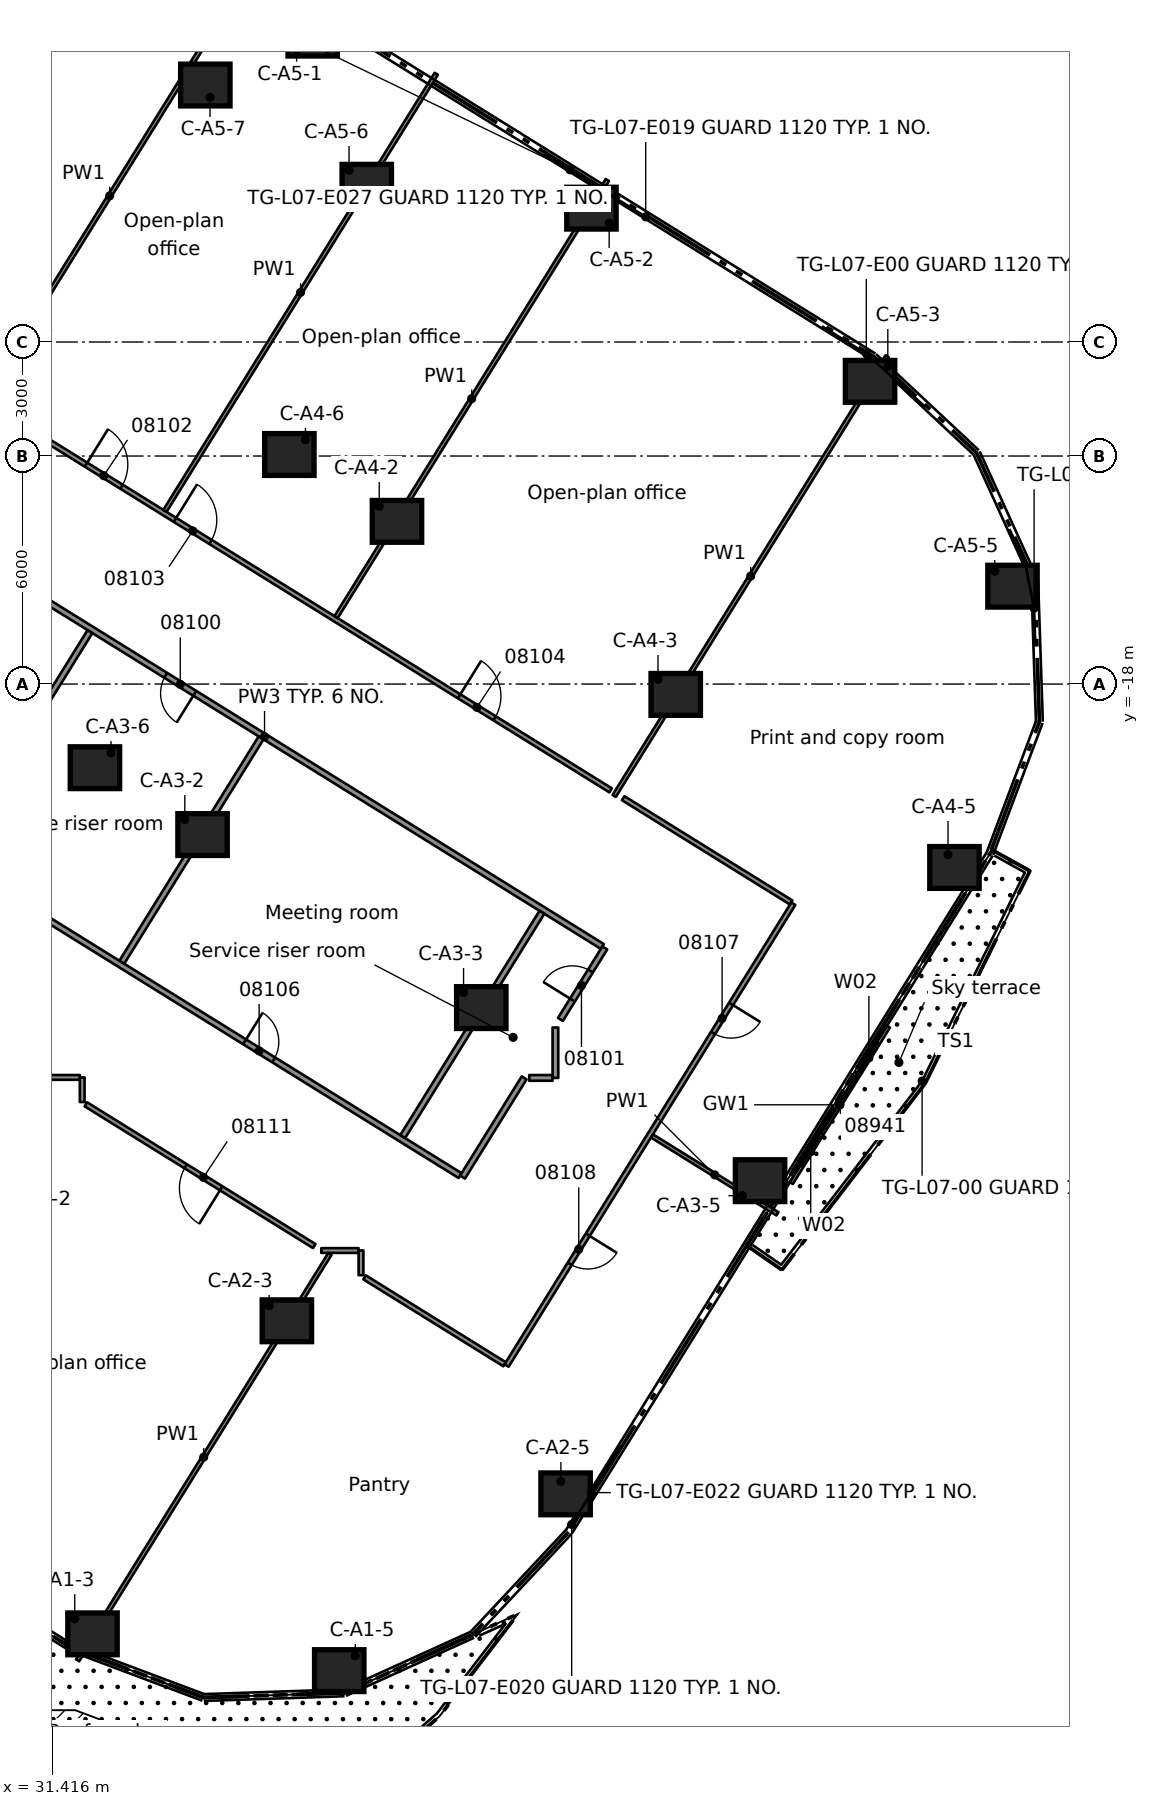
"""IFC4 building model, lengths in metres.
Left out: names, types, materials, properties, quantities, classifications, styles, units other than length and angle.
Written with IfcOpenShell. Run it as: python <this file> out.ifc"""

import sys

from ifc_helpers import new_model, si_unit, direction, frame, frame_2d, origin, origin_2d, place, context, subcontext, project, spatial, rectangle, extrude, element, fill, save


model = new_model("IFC4")
c1 = context("Model", 3, precision=1e-05, world=origin(), true_north=direction((0.0, 1.0)))
c2 = subcontext(c1, "Body", "Model", "MODEL_VIEW")
j1 = project(units=[si_unit("LENGTHUNIT", "METRE"), si_unit("PLANEANGLEUNIT", "RADIAN")], contexts=[c1])
p1 = place(None, origin())
s1 = spatial("IfcSite", under=j1, at=p1, CompositionType="ELEMENT")
p2 = place(p1, origin())
s2 = spatial("IfcBuilding", under=s1, at=p2, CompositionType="ELEMENT")
p3 = place(p2, frame((0.0, 0.0, 37.3)))
s3 = spatial("IfcBuildingStorey", under=s2, at=p3, CompositionType="ELEMENT", Elevation=37.3)
for number, where, z_axis, x_axis in (
    (1, (32.475, -42.992, 0.0), (0.0, 0.0, 1.0), (1.0, 0.0, 0.0)),
    (2, (38.968, -43.959, 0.0), (0.0, 0.0, 1.0), (1.0, 0.0, 0.0)),
    (3, (37.59, -34.754, 0.0), (0.0, 0.0, 1.0), (1.0, 0.0, 0.0)),
    (4, (44.924, -39.308, 0.0), (0.0, 0.0, 1.0), (1.0, 0.0, 0.0)),
    (5, (35.371, -21.96, 0.0), (0.0, 0.0, 1.0), (1.0, 0.0, 0.0)),
    (6, (42.706, -26.513, 0.0), (0.0, 0.0, 1.0), (1.0, 0.0, 0.0)),
    (7, (50.041, -31.067, 0.0), (0.0, 0.0, 1.0), (1.0, 0.0, 0.0)),
    (8, (32.539, -20.201, 0.0), (0.0, 0.0, 1.0), (1.0, 0.0, 0.0)),
    (9, (40.487, -13.719, 0.0), (0.0, 0.0, 1.0), (1.0, 0.0, 0.0)),
    (10, (47.822, -18.272, 0.0), (0.0, 0.0, 1.0), (1.0, 0.0, 0.0)),
    (11, (55.157, -22.826, 0.0), (0.0, 0.0, 1.0), (1.0, 0.0, 0.0)),
    (12, (37.655, -11.96, 0.0), (0.0, 0.0, 1.0), (1.0, 0.0, 0.0)),
    (13, (38.269, -0.924, 0.0), (0.0, 0.0, 1.0), (1.0, 0.0, 0.0)),
    (14, (45.604, -5.478, 0.0), (0.0, 0.0, 1.0), (1.0, 0.0, 0.0)),
    (15, (52.936, -10.035, 0.0), (0.0, 0.0, 1.0), (1.0, 0.0, 0.0)),
    (16, (56.684, -15.425, 0.0), (0.0, 0.0, 1.0), (1.0, 0.0, 0.0)),
    (17, (39.692, -4.876, 0.0), (0.0, 0.0, 1.0), (1.0, 0.0, 0.0)),
    (18, (35.444, -2.238, 0.0), (0.0, 0.0, 1.0), (1.0, 0.0, 0.0)),
):
    element("IfcColumn", number, at=place(p3, frame(where, z_axis=z_axis, x_axis=x_axis)), inside=s3, PredefinedType="COLUMN", context=c2, shape_type="SweptSolid", body=[
        extrude(rectangle(XDim=1.3, YDim=1.1, at=origin_2d()), origin(), (0.0, 0.0, 1.0), 3.5),
    ])
p4 = place(p3, frame((53.417, -27.013, 0.0), z_axis=(0.0, 0.0, 1.0), x_axis=(-0.527459466272, -0.84958019718, 0.0)))
e19 = element("IfcWall", 19, at=p4, inside=s3, PredefinedType="STANDARD", context=c2, shape_type="SweptSolid", body=[
    extrude(rectangle(XDim=4.844, YDim=0.1, at=frame_2d((2.422, 0.0))), origin(), (0.0, 0.0, 1.0), 3.08),
])
p5 = place(p4, frame((1.522, 0.0, 0.0)))
e20 = element("IfcOpeningElement", 20, at=p5, cuts=e19, PredefinedType="OPENING", context=c2, shape_type="SweptSolid", body=[
    extrude(rectangle(XDim=1.8, YDim=2.4, at=frame_2d((0.9, 1.2))), frame((0.0, 0.06, 0.0), z_axis=(0.0, -1.0, 0.0), x_axis=(1.0, 0.0, 0.0)), (0.0, 0.0, 1.0), 0.12),
])
p6 = place(p4, frame((0.522, 0.0, 0.0)))
e21 = element("IfcOpeningElement", 21, at=p6, cuts=e19, PredefinedType="OPENING", context=c2, shape_type="SweptSolid", body=[
    extrude(rectangle(XDim=0.9, YDim=2.4, at=frame_2d((0.45, 1.2))), frame((0.0, 0.06, 0.0), z_axis=(0.0, -1.0, 0.0), x_axis=(1.0, 0.0, 0.0)), (0.0, 0.0, 1.0), 0.12),
])
p7 = place(p4, frame((3.422, 0.0, 0.0)))
e22 = element("IfcOpeningElement", 22, at=p7, cuts=e19, PredefinedType="OPENING", context=c2, shape_type="SweptSolid", body=[
    extrude(rectangle(XDim=0.9, YDim=2.4, at=frame_2d((0.45, 1.2))), frame((0.0, 0.06, 0.0), z_axis=(0.0, -1.0, 0.0), x_axis=(1.0, 0.0, 0.0)), (0.0, 0.0, 1.0), 0.12),
])
p8 = place(p3, frame((38.31, -32.788, 0.0), z_axis=(0.0, 0.0, 1.0), x_axis=(-0.849663629849, 0.527325057352, 0.0)))
e23 = element("IfcWall", 23, at=p8, inside=s3, PredefinedType="PARTITIONING", context=c2, shape_type="SweptSolid", body=[
    extrude(rectangle(XDim=7.073, YDim=0.125, at=frame_2d((3.537, 0.0))), origin(), (0.0, 0.0, 1.0), 3.06),
])
p9 = place(p8, frame((2.881, 0.0, 0.0)))
e24 = element("IfcOpeningElement", 24, at=p9, cuts=e23, PredefinedType="OPENING", context=c2, shape_type="SweptSolid", body=[
    extrude(rectangle(XDim=1.1, YDim=2.1, at=frame_2d((0.55, 1.05))), frame((0.0, 0.073, 0.0), z_axis=(0.0, -1.0, 0.0), x_axis=(1.0, 0.0, 0.0)), (0.0, 0.0, 1.0), 0.145),
])
p10 = place(p3, frame((39.635, -33.612, 0.0), z_axis=(0.0, 0.0, 1.0), x_axis=(0.849721068894, -0.527232496226, 0.0)))
e25 = element("IfcWall", 25, at=p10, inside=s3, PredefinedType="PARTITIONING", context=c2, shape_type="SweptSolid", body=[
    extrude(rectangle(XDim=4.336, YDim=0.125, at=frame_2d((2.168, 0.0))), origin(), (0.0, 0.0, 1.0), 3.06),
])
p11 = place(p3, frame((29.735, -23.228, 0.0), z_axis=(0.0, 0.0, 1.0), x_axis=(0.849593173651, -0.527438564466, 0.0)))
e26 = element("IfcWall", 26, at=p11, inside=s3, PredefinedType="PARTITIONING", context=c2, shape_type="SweptSolid", body=[
    extrude(rectangle(XDim=14.61, YDim=0.15, at=frame_2d((7.305, 0.0))), origin(), (0.0, 0.0, 1.0), 3.06),
])
p12 = place(p11, frame((7.936, 0.0, 0.0)))
e27 = element("IfcOpeningElement", 27, at=p12, cuts=e26, PredefinedType="OPENING", context=c2, shape_type="SweptSolid", body=[
    extrude(rectangle(XDim=0.9, YDim=2.1, at=frame_2d((0.45, 1.05))), frame((0.0, 0.085, 0.0), z_axis=(0.0, -1.0, 0.0), x_axis=(1.0, 0.0, 0.0)), (0.0, 0.0, 1.0), 0.17),
])
p13 = place(p3, frame((47.196, -29.89, 0.0), z_axis=(0.0, 0.0, 1.0), x_axis=(0.84964889907, -0.527348791891, 0.0)))
e28 = element("IfcWall", 28, at=p13, inside=s3, PredefinedType="PARTITIONING", context=c2, shape_type="SweptSolid", body=[
    extrude(rectangle(XDim=3.887, YDim=0.1, at=frame_2d((1.944, 0.0))), origin(), (0.0, 0.0, 1.0), 3.06),
])
p14 = place(p3, frame((45.891, -24.905, 0.0), z_axis=(0.0, 0.0, 1.0), x_axis=(-0.849504231943, 0.527581803999, 0.0)))
e29 = element("IfcWall", 29, at=p14, inside=s3, PredefinedType="PARTITIONING", context=c2, shape_type="SweptSolid", body=[
    extrude(rectangle(XDim=20.927, YDim=0.15, at=frame_2d((10.464, 0.0))), origin(), (0.0, 0.0, 1.0), 3.06),
])
p15 = place(p14, frame((12.625, 0.0, 0.0)))
e30 = element("IfcOpeningElement", 30, at=p15, cuts=e29, PredefinedType="OPENING", context=c2, shape_type="SweptSolid", body=[
    extrude(rectangle(XDim=0.9, YDim=2.1, at=frame_2d((0.45, 1.05))), frame((0.0, 0.085, 0.0), z_axis=(0.0, -1.0, 0.0), x_axis=(1.0, 0.0, 0.0)), (0.0, 0.0, 1.0), 0.17),
])
p16 = place(p14, frame((17.925, 0.0, 0.0)))
e31 = element("IfcOpeningElement", 31, at=p16, cuts=e29, PredefinedType="OPENING", context=c2, shape_type="SweptSolid", body=[
    extrude(rectangle(XDim=1.1, YDim=2.1, at=frame_2d((0.55, 1.05))), frame((0.0, 0.085, 0.0), z_axis=(0.0, -1.0, 0.0), x_axis=(1.0, 0.0, 0.0)), (0.0, 0.0, 1.0), 0.17),
])
p17 = place(p3, frame((31.21, -11.548, 0.0), z_axis=(0.0, 0.0, 1.0), x_axis=(0.849604026752, -0.527421081989, 0.0)))
e32 = element("IfcWall", 32, at=p17, inside=s3, PredefinedType="PARTITIONING", context=c2, shape_type="SweptSolid", body=[
    extrude(rectangle(XDim=17.536, YDim=0.125, at=frame_2d((8.768, 0.0))), origin(), (0.0, 0.0, 1.0), 3.06),
])
p18 = place(p17, frame((1.288, 0.0, 0.0)))
e33 = element("IfcOpeningElement", 33, at=p18, cuts=e32, PredefinedType="OPENING", context=c2, shape_type="SweptSolid", body=[
    extrude(rectangle(XDim=1.1, YDim=2.1, at=frame_2d((0.55, 1.05))), frame((0.0, 0.073, 0.0), z_axis=(0.0, -1.0, 0.0), x_axis=(1.0, 0.0, 0.0)), (0.0, 0.0, 1.0), 0.145),
])
p19 = place(p17, frame((4.043, 0.0, 0.0)))
e34 = element("IfcOpeningElement", 34, at=p19, cuts=e32, PredefinedType="OPENING", context=c2, shape_type="SweptSolid", body=[
    extrude(rectangle(XDim=1.1, YDim=2.1, at=frame_2d((0.55, 1.05))), frame((0.0, 0.073, 0.0), z_axis=(0.0, -1.0, 0.0), x_axis=(1.0, 0.0, 0.0)), (0.0, 0.0, 1.0), 0.145),
])
p20 = place(p17, frame((12.844, 0.0, 0.0)))
e35 = element("IfcOpeningElement", 35, at=p20, cuts=e32, PredefinedType="OPENING", context=c2, shape_type="SweptSolid", body=[
    extrude(rectangle(XDim=1.1, YDim=2.1, at=frame_2d((0.55, 1.05))), frame((0.0, 0.073, 0.0), z_axis=(0.0, -1.0, 0.0), x_axis=(1.0, 0.0, 0.0)), (0.0, 0.0, 1.0), 0.145),
])
p21 = place(p3, frame((46.439, -21.003, 0.0), z_axis=(0.0, 0.0, 1.0), x_axis=(0.849609726163, -0.527411900899, 0.0)))
e36 = element("IfcWall", 36, at=p21, inside=s3, PredefinedType="PARTITIONING", context=c2, shape_type="SweptSolid", body=[
    extrude(rectangle(XDim=5.205, YDim=0.125, at=frame_2d((2.603, 0.0))), origin(), (0.0, 0.0, 1.0), 3.06),
])
p22 = place(p3, frame((38.496, -32.905, 0.0), z_axis=(0.0, 0.0, 1.0), x_axis=(1.0, 0.0, 0.0)))
e37 = element("IfcWall", 37, at=p22, inside=s3, PredefinedType="PARTITIONING", context=c2, shape_type="SweptSolid", body=[
    extrude(rectangle(XDim=0.981, YDim=0.125, at=frame_2d((0.49, 0.0))), origin(), (0.0, 0.0, 1.0), 3.06),
])
p23 = place(p3, frame((43.968, -28.363, 0.0), z_axis=(0.0, 0.0, 1.0), x_axis=(1.0, 0.0, 0.0)))
e38 = element("IfcWall", 38, at=p23, inside=s3, PredefinedType="PARTITIONING", context=c2, shape_type="SweptSolid", body=[
    extrude(rectangle(XDim=0.613, YDim=0.15, at=frame_2d((0.307, 0.0))), origin(), (0.0, 0.0, 1.0), 3.06),
])
p24 = place(p3, frame((31.161, -28.35, 0.0), z_axis=(0.0, 0.0, 1.0), x_axis=(1.0, 0.0, 0.0)))
e39 = element("IfcWall", 39, at=p24, inside=s3, PredefinedType="PARTITIONING", context=c2, shape_type="SweptSolid", body=[
    extrude(rectangle(XDim=0.981, YDim=0.125, at=frame_2d((0.491, 0.0))), origin(), (0.0, 0.0, 1.0), 3.06),
])
p25 = place(p3, frame((50.916, -23.78, 0.0), z_axis=(0.0, 0.0, 1.0), x_axis=(-0.527464838764, -0.84957686166, 0.0)))
e40 = element("IfcWall", 40, at=p25, inside=s3, PredefinedType="PARTITIONING", context=c2, shape_type="SweptSolid", body=[
    extrude(rectangle(XDim=14.302, YDim=0.125, at=frame_2d((7.151, 0.0))), origin(), (0.0, 0.0, 1.0), 3.06),
])
p26 = place(p25, frame((3.103, 0.0, 0.0)))
e41 = element("IfcOpeningElement", 41, at=p26, cuts=e40, PredefinedType="OPENING", context=c2, shape_type="SweptSolid", body=[
    extrude(rectangle(XDim=0.9, YDim=2.1, at=frame_2d((0.45, 1.05))), frame((0.0, 0.073, 0.0), z_axis=(0.0, -1.0, 0.0), x_axis=(1.0, 0.0, 0.0)), (0.0, 0.0, 1.0), 0.145),
])
p27 = place(p25, frame((10.253, 0.0, 0.0)))
e42 = element("IfcOpeningElement", 42, at=p27, cuts=e40, PredefinedType="OPENING", context=c2, shape_type="SweptSolid", body=[
    extrude(rectangle(XDim=0.9, YDim=2.1, at=frame_2d((0.45, 1.05))), frame((0.0, 0.073, 0.0), z_axis=(0.0, -1.0, 0.0), x_axis=(1.0, 0.0, 0.0)), (0.0, 0.0, 1.0), 0.145),
])
p28 = place(p3, frame((42.212, -30.973, 0.0), z_axis=(0.0, 0.0, 1.0), x_axis=(0.527639763473, 0.849468233663, 0.0)))
e43 = element("IfcWall", 43, at=p28, inside=s3, PredefinedType="PARTITIONING", context=c2, shape_type="SweptSolid", body=[
    extrude(rectangle(XDim=3.072, YDim=0.15, at=frame_2d((1.536, 0.0))), origin(), (0.0, 0.0, 1.0), 3.06),
])
p29 = place(p3, frame((44.788, -26.825, 0.0), z_axis=(0.0, 0.0, 1.0), x_axis=(0.527094056537, 0.849806951938, 0.0)))
e44 = element("IfcWall", 44, at=p29, inside=s3, PredefinedType="PARTITIONING", context=c2, shape_type="SweptSolid", body=[
    extrude(rectangle(XDim=2.216, YDim=0.15, at=frame_2d((1.108, 0.0))), origin(), (0.0, 0.0, 1.0), 3.06),
])
p30 = place(p29, frame((0.6, 0.0, 0.0)))
e45 = element("IfcOpeningElement", 45, at=p30, cuts=e44, PredefinedType="OPENING", context=c2, shape_type="SweptSolid", body=[
    extrude(rectangle(XDim=0.9, YDim=2.1, at=frame_2d((0.45, 1.05))), frame((0.0, 0.085, 0.0), z_axis=(0.0, -1.0, 0.0), x_axis=(1.0, 0.0, 0.0)), (0.0, 0.0, 1.0), 0.17),
])
p31 = place(p3, frame((32.082, -43.688, 0.0), z_axis=(0.0, 0.0, 1.0), x_axis=(0.527487900205, 0.849562543394, 0.0)))
e46 = element("IfcWall", 46, at=p31, inside=s3, PredefinedType="PARTITIONING", context=c2, shape_type="SweptSolid", body=[
    extrude(rectangle(XDim=12.588, YDim=0.1, at=frame_2d((6.294, 0.0))), origin(), (0.0, 0.0, 1.0), 3.06),
])
p32 = place(p3, frame((40.638, -29.907, 0.0), z_axis=(0.0, 0.0, 1.0), x_axis=(0.527371608889, 0.849634736895, 0.0)))
e47 = element("IfcWall", 47, at=p32, inside=s3, PredefinedType="PARTITIONING", context=c2, shape_type="SweptSolid", body=[
    extrude(rectangle(XDim=6.948, YDim=0.15, at=frame_2d((3.474, 0.0))), origin(), (0.0, 0.0, 1.0), 3.06),
])
p33 = place(p3, frame((46.203, -20.944, 0.0), z_axis=(0.0, 0.0, 1.0), x_axis=(0.527452109832, 0.849584764361, 0.0)))
e48 = element("IfcWall", 48, at=p33, inside=s3, PredefinedType="PARTITIONING", context=c2, shape_type="SweptSolid", body=[
    extrude(rectangle(XDim=13.618, YDim=0.1, at=frame_2d((6.809, 0.0))), origin(), (0.0, 0.0, 1.0), 3.06),
])
p34 = place(p3, frame((33.247, -25.319, 0.0), z_axis=(0.0, 0.0, 1.0), x_axis=(0.527346241806, 0.849650481818, 0.0)))
e49 = element("IfcWall", 49, at=p34, inside=s3, PredefinedType="PARTITIONING", context=c2, shape_type="SweptSolid", body=[
    extrude(rectangle(XDim=6.948, YDim=0.15, at=frame_2d((3.474, 0.0))), origin(), (0.0, 0.0, 1.0), 3.06),
])
p35 = place(p3, frame((38.884, -16.239, 0.0), z_axis=(0.0, 0.0, 1.0), x_axis=(0.527383064754, 0.849627626087, 0.0)))
e50 = element("IfcWall", 50, at=p35, inside=s3, PredefinedType="PARTITIONING", context=c2, shape_type="SweptSolid", body=[
    extrude(rectangle(XDim=13.536, YDim=0.1, at=frame_2d((6.768, 0.0))), origin(), (0.0, 0.0, 1.0), 3.06),
])
p36 = place(p3, frame((28.46, -22.98, 0.0), z_axis=(0.0, 0.0, 1.0), x_axis=(0.527410761015, 0.849610433767, 0.0)))
e51 = element("IfcWall", 51, at=p36, inside=s3, PredefinedType="PARTITIONING", context=c2, shape_type="SweptSolid", body=[
    extrude(rectangle(XDim=7.486, YDim=0.15, at=frame_2d((3.743, 0.0))), origin(), (0.0, 0.0, 1.0), 3.06),
])
p37 = place(p3, frame((34.381, -13.443, 0.0), z_axis=(0.0, 0.0, 1.0), x_axis=(0.527467467503, 0.849575229586, 0.0)))
e52 = element("IfcWall", 52, at=p37, inside=s3, PredefinedType="PARTITIONING", context=c2, shape_type="SweptSolid", body=[
    extrude(rectangle(XDim=13.536, YDim=0.1, at=frame_2d((6.768, 0.0))), origin(), (0.0, 0.0, 1.0), 3.06),
])
p38 = place(p3, frame((29.098, -11.322, 0.0), z_axis=(0.0, 0.0, 1.0), x_axis=(0.527451584377, 0.849585090582, 0.0)))
e53 = element("IfcWall", 53, at=p38, inside=s3, PredefinedType="PARTITIONING", context=c2, shape_type="SweptSolid", body=[
    extrude(rectangle(XDim=14.521, YDim=0.1, at=frame_2d((7.26, 0.0))), origin(), (0.0, 0.0, 1.0), 3.06),
])
p39 = place(p3, frame((44.656, -28.363, 0.0), z_axis=(0.0, 0.0, 1.0), x_axis=(0.0, 1.0, 0.0)))
e54 = element("IfcWall", 54, at=p39, inside=s3, PredefinedType="PARTITIONING", context=c2, shape_type="SweptSolid", body=[
    extrude(rectangle(XDim=1.326, YDim=0.15, at=frame_2d((0.663, 0.0))), origin(), (0.0, 0.0, 1.0), 3.06),
])
for number, where, z_axis, x_axis in (
    (55, (39.54, -33.553, 0.0), (0.0, 0.0, 1.0), (0.0, 1.0, 0.0)),
    (56, (32.204, -28.998, 0.0), (0.0, 0.0, 1.0), (0.0, 1.0, 0.0)),
):
    element("IfcWall", number, at=place(p3, frame(where, z_axis=z_axis, x_axis=x_axis)), inside=s3, PredefinedType="PARTITIONING", context=c2, shape_type="SweptSolid", body=[
        extrude(rectangle(XDim=0.648, YDim=0.125, at=frame_2d((0.324, 0.0))), origin(), (0.0, 0.0, 1.0), 3.06),
    ])
p40 = place(p5, origin())
e57 = element("IfcDoor", 57, at=p40, inside=s3, OperationType="DOUBLE_DOOR_SLIDING", PredefinedType="DOOR", context=c2, shape_type="SweptSolid", body=[
    extrude(rectangle(XDim=1.8, YDim=2.4, at=frame_2d((0.9, 1.2))), frame((0.0, 0.025, 0.0), z_axis=(0.0, -1.0, 0.0), x_axis=(1.0, 0.0, 0.0)), (0.0, 0.0, 1.0), 0.05),
])
fill(e20, e57)
p41 = place(p6, origin())
e58 = element("IfcWindow", 58, at=p41, inside=s3, PartitioningType="SINGLE_PANEL", PredefinedType="WINDOW", context=c2, shape_type="SweptSolid", body=[
    extrude(rectangle(XDim=0.9, YDim=2.4, at=frame_2d((0.45, 1.2))), frame((0.0, 0.03, 0.0), z_axis=(0.0, -1.0, 0.0), x_axis=(1.0, 0.0, 0.0)), (0.0, 0.0, 1.0), 0.06),
])
fill(e21, e58)
p42 = place(p7, origin())
e59 = element("IfcWindow", 59, at=p42, inside=s3, PartitioningType="SINGLE_PANEL", PredefinedType="WINDOW", context=c2, shape_type="SweptSolid", body=[
    extrude(rectangle(XDim=0.9, YDim=2.4, at=frame_2d((0.45, 1.2))), frame((0.0, 0.03, 0.0), z_axis=(0.0, -1.0, 0.0), x_axis=(1.0, 0.0, 0.0)), (0.0, 0.0, 1.0), 0.06),
])
fill(e22, e59)
p43 = place(p15, origin())
e60 = element("IfcDoor", 60, at=p43, inside=s3, OperationType="SINGLE_SWING_RIGHT", PredefinedType="DOOR", context=c2, shape_type="SweptSolid", body=[
    extrude(rectangle(XDim=0.9, YDim=2.1, at=frame_2d((0.45, 1.05))), frame((0.0, 0.025, 0.0), z_axis=(0.0, -1.0, 0.0), x_axis=(1.0, 0.0, 0.0)), (0.0, 0.0, 1.0), 0.05),
])
fill(e30, e60)
p44 = place(p30, origin())
e61 = element("IfcDoor", 61, at=p44, inside=s3, OperationType="SINGLE_SWING_LEFT", PredefinedType="DOOR", context=c2, shape_type="SweptSolid", body=[
    extrude(rectangle(XDim=0.9, YDim=2.1, at=frame_2d((0.45, 1.05))), frame((0.0, 0.025, 0.0), z_axis=(0.0, -1.0, 0.0), x_axis=(1.0, 0.0, 0.0)), (0.0, 0.0, 1.0), 0.05),
])
fill(e45, e61)
p45 = place(p18, origin())
e62 = element("IfcDoor", 62, at=p45, inside=s3, OperationType="SINGLE_SWING_LEFT", PredefinedType="DOOR", context=c2, shape_type="SweptSolid", body=[
    extrude(rectangle(XDim=1.1, YDim=2.1, at=frame_2d((0.55, 1.05))), frame((0.0, 0.025, 0.0), z_axis=(0.0, -1.0, 0.0), x_axis=(1.0, 0.0, 0.0)), (0.0, 0.0, 1.0), 0.05),
])
fill(e33, e62)
p46 = place(p19, origin())
e63 = element("IfcDoor", 63, at=p46, inside=s3, OperationType="SINGLE_SWING_LEFT", PredefinedType="DOOR", context=c2, shape_type="SweptSolid", body=[
    extrude(rectangle(XDim=1.1, YDim=2.1, at=frame_2d((0.55, 1.05))), frame((0.0, 0.025, 0.0), z_axis=(0.0, -1.0, 0.0), x_axis=(1.0, 0.0, 0.0)), (0.0, 0.0, 1.0), 0.05),
])
fill(e34, e63)
p47 = place(p20, origin())
e64 = element("IfcDoor", 64, at=p47, inside=s3, OperationType="SINGLE_SWING_RIGHT", PredefinedType="DOOR", context=c2, shape_type="SweptSolid", body=[
    extrude(rectangle(XDim=1.1, YDim=2.1, at=frame_2d((0.55, 1.05))), frame((0.0, 0.025, 0.0), z_axis=(0.0, -1.0, 0.0), x_axis=(1.0, 0.0, 0.0)), (0.0, 0.0, 1.0), 0.05),
])
fill(e35, e64)
p48 = place(p12, origin())
e65 = element("IfcDoor", 65, at=p48, inside=s3, OperationType="SINGLE_SWING_RIGHT", PredefinedType="DOOR", context=c2, shape_type="SweptSolid", body=[
    extrude(rectangle(XDim=0.9, YDim=2.1, at=frame_2d((0.45, 1.05))), frame((0.0, 0.025, 0.0), z_axis=(0.0, -1.0, 0.0), x_axis=(1.0, 0.0, 0.0)), (0.0, 0.0, 1.0), 0.05),
])
fill(e27, e65)
p49 = place(p26, origin())
e66 = element("IfcDoor", 66, at=p49, inside=s3, OperationType="SINGLE_SWING_LEFT", PredefinedType="DOOR", context=c2, shape_type="SweptSolid", body=[
    extrude(rectangle(XDim=0.9, YDim=2.1, at=frame_2d((0.45, 1.05))), frame((0.0, 0.025, 0.0), z_axis=(0.0, -1.0, 0.0), x_axis=(1.0, 0.0, 0.0)), (0.0, 0.0, 1.0), 0.05),
])
fill(e41, e66)
p50 = place(p27, origin())
e67 = element("IfcDoor", 67, at=p50, inside=s3, OperationType="SINGLE_SWING_RIGHT", PredefinedType="DOOR", context=c2, shape_type="SweptSolid", body=[
    extrude(rectangle(XDim=0.9, YDim=2.1, at=frame_2d((0.45, 1.05))), frame((0.0, 0.025, 0.0), z_axis=(0.0, -1.0, 0.0), x_axis=(1.0, 0.0, 0.0)), (0.0, 0.0, 1.0), 0.05),
])
fill(e42, e67)
p51 = place(p9, origin())
e68 = element("IfcDoor", 68, at=p51, inside=s3, OperationType="SINGLE_SWING_LEFT", PredefinedType="DOOR", context=c2, shape_type="SweptSolid", body=[
    extrude(rectangle(XDim=1.1, YDim=2.1, at=frame_2d((0.55, 1.05))), frame((0.0, 0.025, 0.0), z_axis=(0.0, -1.0, 0.0), x_axis=(1.0, 0.0, 0.0)), (0.0, 0.0, 1.0), 0.05),
])
fill(e24, e68)
save(model, sys.argv[1])
